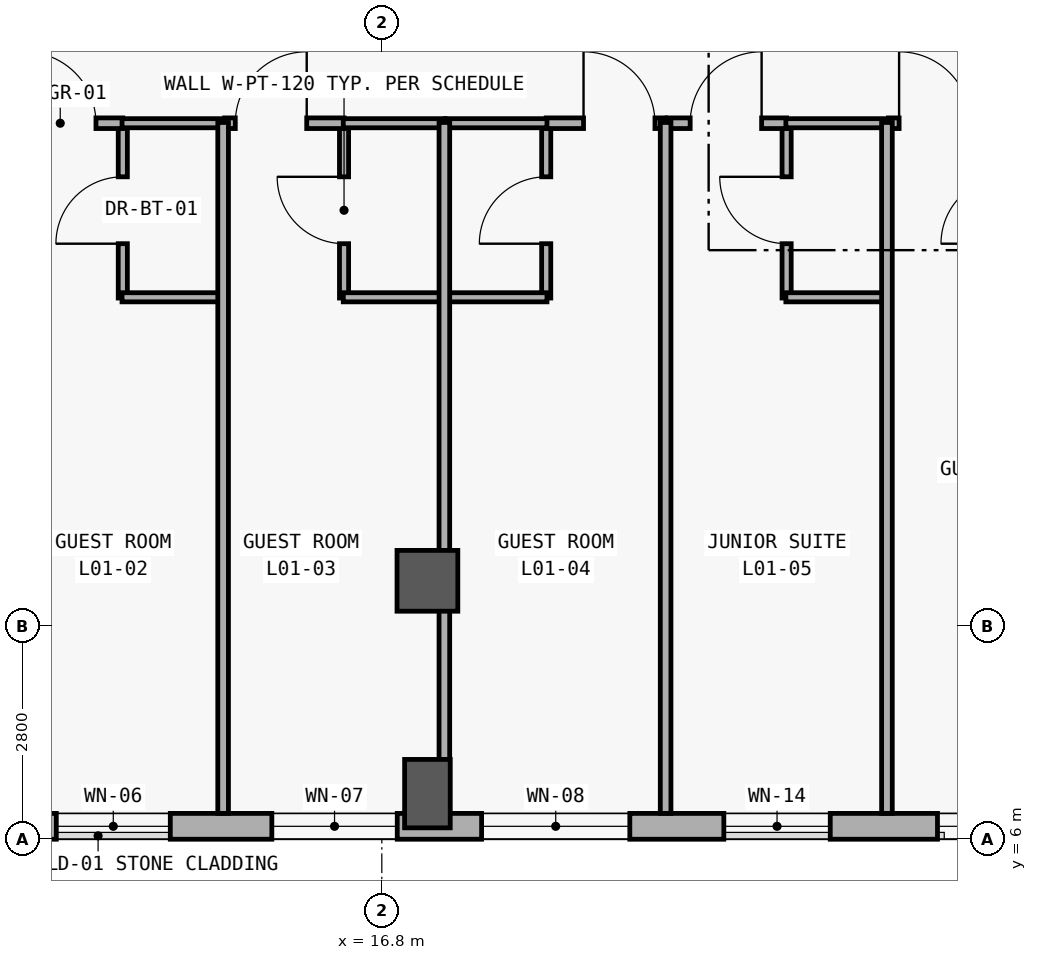
"""IFC4 building model, lengths in metres.
Left out: names, types, materials, properties, quantities, classifications, styles, units other than length and angle.
Written with IfcOpenShell. Run it as: python <this file> out.ifc"""

import sys

from ifc_helpers import new_model, si_unit, direction, frame, frame_2d, origin, origin_2d, place, context, subcontext, project, spatial, rectangle, extrude, element, fill, save


model = new_model("IFC4")
c1 = context("Model", 3, precision=1e-05, world=origin(), true_north=direction((0.0, 1.0)))
c2 = subcontext(c1, "Body", "Model", "MODEL_VIEW")
j1 = project(units=[si_unit("LENGTHUNIT", "METRE"), si_unit("PLANEANGLEUNIT", "RADIAN")], contexts=[c1])
p1 = place(None, origin())
s1 = spatial("IfcSite", under=j1, at=p1, CompositionType="ELEMENT")
p2 = place(p1, origin())
s2 = spatial("IfcBuilding", under=s1, at=p2, CompositionType="ELEMENT")
p3 = place(p2, frame((0.0, 0.0, 5.4)))
s3 = spatial("IfcBuildingStorey", under=s2, at=p3, CompositionType="ELEMENT", Elevation=5.4)
p4 = place(p3, frame((17.4, 6.6, 0.0), z_axis=(0.0, 0.0, 1.0), x_axis=(0.0, 1.0, 0.0)))
e1 = element("IfcColumn", 1, at=p4, inside=s3, PredefinedType="COLUMN", context=c2, shape_type="SweptSolid", body=[
    extrude(rectangle(XDim=0.6, YDim=0.9, at=origin_2d()), origin(), (0.0, 0.0, 1.0), 5.4),
])
p5 = place(p3, frame((17.4, 9.4, 0.0), z_axis=(0.0, 0.0, 1.0), x_axis=(1.0, 0.0, 0.0)))
e2 = element("IfcColumn", 2, at=p5, inside=s3, PredefinedType="COLUMN", context=c2, shape_type="SweptSolid", body=[
    extrude(rectangle(XDim=0.8, YDim=0.8, at=origin_2d()), origin(), (0.0, 0.0, 1.0), 5.4),
])
p6 = place(p3, frame((92.06, 6.17, 0.0), z_axis=(0.0, 0.0, 1.0), x_axis=(-1.0, 0.0, 0.0)))
e3 = element("IfcWall", 3, at=p6, inside=s3, PredefinedType="SOLIDWALL", context=c2, shape_type="SweptSolid", body=[
    extrude(rectangle(XDim=83.32, YDim=0.34, at=frame_2d((41.66, 0.0))), origin(), (0.0, 0.0, 1.0), 5.1),
])
p7 = place(p6, frame((80.804, 0.0, 0.85)))
e4 = element("IfcOpeningElement", 4, at=p7, cuts=e3, PredefinedType="OPENING", context=c2, shape_type="SweptSolid", body=[
    extrude(rectangle(XDim=1.8, YDim=1.8, at=frame_2d((0.9, 0.9))), frame((0.0, 0.18, 0.0), z_axis=(0.0, -1.0, 0.0), x_axis=(1.0, 0.0, 0.0)), (0.0, 0.0, 1.0), 0.36),
])
p8 = place(p6, frame((78.043, 0.0, 0.85)))
e5 = element("IfcOpeningElement", 5, at=p8, cuts=e3, PredefinedType="OPENING", context=c2, shape_type="SweptSolid", body=[
    extrude(rectangle(XDim=1.5, YDim=1.75, at=frame_2d((0.75, 0.875))), frame((0.0, 0.18, 0.0), z_axis=(0.0, -1.0, 0.0), x_axis=(1.0, 0.0, 0.0)), (0.0, 0.0, 1.0), 0.36),
])
p9 = place(p6, frame((75.057, 0.0, 0.85)))
e6 = element("IfcOpeningElement", 6, at=p9, cuts=e3, PredefinedType="OPENING", context=c2, shape_type="SweptSolid", body=[
    extrude(rectangle(XDim=1.65, YDim=1.75, at=frame_2d((0.825, 0.875))), frame((0.0, 0.18, 0.0), z_axis=(0.0, -1.0, 0.0), x_axis=(1.0, 0.0, 0.0)), (0.0, 0.0, 1.0), 0.36),
])
p10 = place(p6, frame((71.997, 0.0, 0.85)))
e7 = element("IfcOpeningElement", 7, at=p10, cuts=e3, PredefinedType="OPENING", context=c2, shape_type="SweptSolid", body=[
    extrude(rectangle(XDim=1.95, YDim=1.75, at=frame_2d((0.975, 0.875))), frame((0.0, 0.18, 0.0), z_axis=(0.0, -1.0, 0.0), x_axis=(1.0, 0.0, 0.0)), (0.0, 0.0, 1.0), 0.36),
])
p11 = place(p6, frame((69.36, 0.0, 0.85)))
e8 = element("IfcOpeningElement", 8, at=p11, cuts=e3, PredefinedType="OPENING", context=c2, shape_type="SweptSolid", body=[
    extrude(rectangle(XDim=1.4, YDim=1.6, at=frame_2d((0.7, 0.8))), frame((0.0, 0.18, 0.0), z_axis=(0.0, -1.0, 0.0), x_axis=(1.0, 0.0, 0.0)), (0.0, 0.0, 1.0), 0.36),
])
p12 = place(p6, frame((66.349, 0.0, 0.85)))
e9 = element("IfcOpeningElement", 9, at=p12, cuts=e3, PredefinedType="OPENING", context=c2, shape_type="SweptSolid", body=[
    extrude(rectangle(XDim=1.6, YDim=1.6, at=frame_2d((0.8, 0.8))), frame((0.0, 0.18, 0.0), z_axis=(0.0, -1.0, 0.0), x_axis=(1.0, 0.0, 0.0)), (0.0, 0.0, 1.0), 0.36),
])
p13 = place(p6, frame((63.338, 0.0, 0.85)))
e10 = element("IfcOpeningElement", 10, at=p13, cuts=e3, PredefinedType="OPENING", context=c2, shape_type="SweptSolid", body=[
    extrude(rectangle(XDim=1.8, YDim=1.6, at=frame_2d((0.9, 0.8))), frame((0.0, 0.18, 0.0), z_axis=(0.0, -1.0, 0.0), x_axis=(1.0, 0.0, 0.0)), (0.0, 0.0, 1.0), 0.36),
])
p14 = place(p6, frame((60.327, 0.0, 0.85)))
e11 = element("IfcOpeningElement", 11, at=p14, cuts=e3, PredefinedType="OPENING", context=c2, shape_type="SweptSolid", body=[
    extrude(rectangle(XDim=2.0, YDim=1.65, at=frame_2d((1.0, 0.825))), frame((0.0, 0.18, 0.0), z_axis=(0.0, -1.0, 0.0), x_axis=(1.0, 0.0, 0.0)), (0.0, 0.0, 1.0), 0.36),
])
p15 = place(p6, frame((57.791, 0.0, 0.85)))
e12 = element("IfcOpeningElement", 12, at=p15, cuts=e3, PredefinedType="OPENING", context=c2, shape_type="SweptSolid", body=[
    extrude(rectangle(XDim=1.25, YDim=1.45, at=frame_2d((0.625, 0.725))), frame((0.0, 0.18, 0.0), z_axis=(0.0, -1.0, 0.0), x_axis=(1.0, 0.0, 0.0)), (0.0, 0.0, 1.0), 0.36),
])
p16 = place(p6, frame((38.744, 0.0, 0.85)))
e13 = element("IfcOpeningElement", 13, at=p16, cuts=e3, PredefinedType="OPENING", context=c2, shape_type="SweptSolid", body=[
    extrude(rectangle(XDim=3.3, YDim=2.15, at=frame_2d((1.65, 1.075))), frame((0.0, 0.18, 0.0), z_axis=(0.0, -1.0, 0.0), x_axis=(1.0, 0.0, 0.0)), (0.0, 0.0, 1.0), 0.36),
])
p17 = place(p6, frame((35.07, 0.0, 0.85)))
e14 = element("IfcOpeningElement", 14, at=p17, cuts=e3, PredefinedType="OPENING", context=c2, shape_type="SweptSolid", body=[
    extrude(rectangle(XDim=1.18, YDim=1.5, at=frame_2d((0.59, 0.75))), frame((0.0, 0.18, 0.0), z_axis=(0.0, -1.0, 0.0), x_axis=(1.0, 0.0, 0.0)), (0.0, 0.0, 1.0), 0.36),
])
p18 = place(p6, frame((30.287, 0.0, 0.85)))
e15 = element("IfcOpeningElement", 15, at=p18, cuts=e3, PredefinedType="OPENING", context=c2, shape_type="SweptSolid", body=[
    extrude(rectangle(XDim=1.28, YDim=1.6, at=frame_2d((0.64, 0.8))), frame((0.0, 0.18, 0.0), z_axis=(0.0, -1.0, 0.0), x_axis=(1.0, 0.0, 0.0)), (0.0, 0.0, 1.0), 0.36),
])
p19 = place(p6, frame((25.503, 0.0, 0.85)))
e16 = element("IfcOpeningElement", 16, at=p19, cuts=e3, PredefinedType="OPENING", context=c2, shape_type="SweptSolid", body=[
    extrude(rectangle(XDim=1.38, YDim=1.7, at=frame_2d((0.69, 0.85))), frame((0.0, 0.18, 0.0), z_axis=(0.0, -1.0, 0.0), x_axis=(1.0, 0.0, 0.0)), (0.0, 0.0, 1.0), 0.36),
])
p20 = place(p6, frame((20.72, 0.0, 0.85)))
e17 = element("IfcOpeningElement", 17, at=p20, cuts=e3, PredefinedType="OPENING", context=c2, shape_type="SweptSolid", body=[
    extrude(rectangle(XDim=1.48, YDim=1.8, at=frame_2d((0.74, 0.9))), frame((0.0, 0.18, 0.0), z_axis=(0.0, -1.0, 0.0), x_axis=(1.0, 0.0, 0.0)), (0.0, 0.0, 1.0), 0.36),
])
p21 = place(p6, frame((15.937, 0.0, 0.85)))
e18 = element("IfcOpeningElement", 18, at=p21, cuts=e3, PredefinedType="OPENING", context=c2, shape_type="SweptSolid", body=[
    extrude(rectangle(XDim=1.58, YDim=1.85, at=frame_2d((0.79, 0.925))), frame((0.0, 0.18, 0.0), z_axis=(0.0, -1.0, 0.0), x_axis=(1.0, 0.0, 0.0)), (0.0, 0.0, 1.0), 0.36),
])
p22 = place(p6, frame((11.154, 0.0, 0.85)))
e19 = element("IfcOpeningElement", 19, at=p22, cuts=e3, PredefinedType="OPENING", context=c2, shape_type="SweptSolid", body=[
    extrude(rectangle(XDim=1.68, YDim=1.9, at=frame_2d((0.84, 0.95))), frame((0.0, 0.18, 0.0), z_axis=(0.0, -1.0, 0.0), x_axis=(1.0, 0.0, 0.0)), (0.0, 0.0, 1.0), 0.36),
])
p23 = place(p6, frame((6.37, 0.0, 0.85)))
e20 = element("IfcOpeningElement", 20, at=p23, cuts=e3, PredefinedType="OPENING", context=c2, shape_type="SweptSolid", body=[
    extrude(rectangle(XDim=1.78, YDim=1.95, at=frame_2d((0.89, 0.975))), frame((0.0, 0.18, 0.0), z_axis=(0.0, -1.0, 0.0), x_axis=(1.0, 0.0, 0.0)), (0.0, 0.0, 1.0), 0.36),
])
p24 = place(p6, frame((1.586, 0.0, 0.85)))
e21 = element("IfcOpeningElement", 21, at=p24, cuts=e3, PredefinedType="OPENING", context=c2, shape_type="SweptSolid", body=[
    extrude(rectangle(XDim=1.88, YDim=1.95, at=frame_2d((0.94, 0.975))), frame((0.0, 0.18, 0.0), z_axis=(0.0, -1.0, 0.0), x_axis=(1.0, 0.0, 0.0)), (0.0, 0.0, 1.0), 0.36),
])
p25 = place(p3, frame((13.392, 13.12, 0.0), z_axis=(0.0, 0.0, 1.0), x_axis=(0.0, 1.0, 0.0)))
e22 = element("IfcWall", 22, at=p25, inside=s3, PredefinedType="PARTITIONING", context=c2, shape_type="SweptSolid", body=[
    extrude(rectangle(XDim=2.31, YDim=0.12, at=frame_2d((1.155, 0.0))), origin(), (0.0, 0.0, 1.0), 4.18),
])
p26 = place(p25, frame((0.715, 0.0, 0.0)))
e23 = element("IfcOpeningElement", 23, at=p26, cuts=e22, PredefinedType="OPENING", context=c2, shape_type="SweptSolid", body=[
    extrude(rectangle(XDim=0.88, YDim=2.15, at=frame_2d((0.44, 1.075))), frame((0.0, 0.07, 0.0), z_axis=(0.0, -1.0, 0.0), x_axis=(1.0, 0.0, 0.0)), (0.0, 0.0, 1.0), 0.14),
])
p27 = place(p3, frame((16.303, 13.12, 0.0), z_axis=(0.0, 0.0, 1.0), x_axis=(0.0, 1.0, 0.0)))
e24 = element("IfcWall", 24, at=p27, inside=s3, PredefinedType="PARTITIONING", context=c2, shape_type="SweptSolid", body=[
    extrude(rectangle(XDim=2.31, YDim=0.12, at=frame_2d((1.155, 0.0))), origin(), (0.0, 0.0, 1.0), 4.18),
])
p28 = place(p27, frame((0.715, 0.0, 0.0)))
e25 = element("IfcOpeningElement", 25, at=p28, cuts=e24, PredefinedType="OPENING", context=c2, shape_type="SweptSolid", body=[
    extrude(rectangle(XDim=0.88, YDim=2.15, at=frame_2d((0.44, 1.075))), frame((0.0, 0.07, 0.0), z_axis=(0.0, -1.0, 0.0), x_axis=(1.0, 0.0, 0.0)), (0.0, 0.0, 1.0), 0.14),
])
p29 = place(p3, frame((18.963, 13.12, 0.0), z_axis=(0.0, 0.0, 1.0), x_axis=(0.0, 1.0, 0.0)))
e26 = element("IfcWall", 26, at=p29, inside=s3, PredefinedType="PARTITIONING", context=c2, shape_type="SweptSolid", body=[
    extrude(rectangle(XDim=2.31, YDim=0.12, at=frame_2d((1.155, 0.0))), origin(), (0.0, 0.0, 1.0), 4.18),
])
p30 = place(p29, frame((0.715, 0.0, 0.0)))
e27 = element("IfcOpeningElement", 27, at=p30, cuts=e26, PredefinedType="OPENING", context=c2, shape_type="SweptSolid", body=[
    extrude(rectangle(XDim=0.88, YDim=2.15, at=frame_2d((0.44, 1.075))), frame((0.0, 0.07, 0.0), z_axis=(0.0, -1.0, 0.0), x_axis=(1.0, 0.0, 0.0)), (0.0, 0.0, 1.0), 0.14),
])
p31 = place(p3, frame((22.126, 13.12, 0.0), z_axis=(0.0, 0.0, 1.0), x_axis=(0.0, 1.0, 0.0)))
e28 = element("IfcWall", 28, at=p31, inside=s3, PredefinedType="PARTITIONING", context=c2, shape_type="SweptSolid", body=[
    extrude(rectangle(XDim=2.31, YDim=0.12, at=frame_2d((1.155, 0.0))), origin(), (0.0, 0.0, 1.0), 4.18),
])
p32 = place(p31, frame((0.715, 0.0, 0.0)))
e29 = element("IfcOpeningElement", 29, at=p32, cuts=e28, PredefinedType="OPENING", context=c2, shape_type="SweptSolid", body=[
    extrude(rectangle(XDim=0.88, YDim=2.15, at=frame_2d((0.44, 1.075))), frame((0.0, 0.07, 0.0), z_axis=(0.0, -1.0, 0.0), x_axis=(1.0, 0.0, 0.0)), (0.0, 0.0, 1.0), 0.14),
])
p33 = place(p3, frame((11.821, 15.42, 0.0), z_axis=(0.0, 0.0, 1.0), x_axis=(1.0, 0.0, 0.0)))
e30 = element("IfcWall", 30, at=p33, inside=s3, PredefinedType="PARTITIONING", context=c2, shape_type="SweptSolid", body=[
    extrude(rectangle(XDim=1.571, YDim=0.14, at=frame_2d((0.786, 0.0))), origin(), (0.0, 0.0, 1.0), 4.18),
])
p34 = place(p33, frame((0.278, 0.0, 0.0)))
e31 = element("IfcOpeningElement", 31, at=p34, cuts=e30, PredefinedType="OPENING", context=c2, shape_type="SweptSolid", body=[
    extrude(rectangle(XDim=0.94, YDim=2.2, at=frame_2d((0.47, 1.1))), frame((0.0, 0.08, 0.0), z_axis=(0.0, -1.0, 0.0), x_axis=(1.0, 0.0, 0.0)), (0.0, 0.0, 1.0), 0.16),
])
p35 = place(p3, frame((14.732, 15.42, 0.0), z_axis=(0.0, 0.0, 1.0), x_axis=(1.0, 0.0, 0.0)))
e32 = element("IfcWall", 32, at=p35, inside=s3, PredefinedType="PARTITIONING", context=c2, shape_type="SweptSolid", body=[
    extrude(rectangle(XDim=1.571, YDim=0.14, at=frame_2d((0.786, 0.0))), origin(), (0.0, 0.0, 1.0), 4.18),
])
p36 = place(p35, frame((0.14, 0.0, 0.0)))
e33 = element("IfcOpeningElement", 33, at=p36, cuts=e32, PredefinedType="OPENING", context=c2, shape_type="SweptSolid", body=[
    extrude(rectangle(XDim=0.94, YDim=2.2, at=frame_2d((0.47, 1.1))), frame((0.0, 0.08, 0.0), z_axis=(0.0, -1.0, 0.0), x_axis=(1.0, 0.0, 0.0)), (0.0, 0.0, 1.0), 0.16),
])
p37 = place(p3, frame((18.963, 15.42, 0.0), z_axis=(0.0, 0.0, 1.0), x_axis=(1.0, 0.0, 0.0)))
e34 = element("IfcWall", 34, at=p37, inside=s3, PredefinedType="PARTITIONING", context=c2, shape_type="SweptSolid", body=[
    extrude(rectangle(XDim=1.571, YDim=0.14, at=frame_2d((0.786, 0.0))), origin(), (0.0, 0.0, 1.0), 4.18),
])
p38 = place(p37, frame((0.491, 0.0, 0.0)))
e35 = element("IfcOpeningElement", 35, at=p38, cuts=e34, PredefinedType="OPENING", context=c2, shape_type="SweptSolid", body=[
    extrude(rectangle(XDim=0.94, YDim=2.2, at=frame_2d((0.47, 1.1))), frame((0.0, 0.08, 0.0), z_axis=(0.0, -1.0, 0.0), x_axis=(1.0, 0.0, 0.0)), (0.0, 0.0, 1.0), 0.16),
])
p39 = place(p3, frame((20.554, 15.42, 0.0), z_axis=(0.0, 0.0, 1.0), x_axis=(1.0, 0.0, 0.0)))
e36 = element("IfcWall", 36, at=p39, inside=s3, PredefinedType="PARTITIONING", context=c2, shape_type="SweptSolid", body=[
    extrude(rectangle(XDim=1.572, YDim=0.14, at=frame_2d((0.786, 0.0))), origin(), (0.0, 0.0, 1.0), 4.18),
])
p40 = place(p39, frame((0.303, 0.0, 0.0)))
e37 = element("IfcOpeningElement", 37, at=p40, cuts=e36, PredefinedType="OPENING", context=c2, shape_type="SweptSolid", body=[
    extrude(rectangle(XDim=0.94, YDim=2.2, at=frame_2d((0.47, 1.1))), frame((0.0, 0.08, 0.0), z_axis=(0.0, -1.0, 0.0), x_axis=(1.0, 0.0, 0.0)), (0.0, 0.0, 1.0), 0.16),
])
p41 = place(p3, frame((23.466, 15.42, 0.0), z_axis=(0.0, 0.0, 1.0), x_axis=(1.0, 0.0, 0.0)))
e38 = element("IfcWall", 38, at=p41, inside=s3, PredefinedType="PARTITIONING", context=c2, shape_type="SweptSolid", body=[
    extrude(rectangle(XDim=1.571, YDim=0.14, at=frame_2d((0.786, 0.0))), origin(), (0.0, 0.0, 1.0), 4.18),
])
p42 = place(p41, frame((0.14, 0.0, 0.0)))
e39 = element("IfcOpeningElement", 39, at=p42, cuts=e38, PredefinedType="OPENING", context=c2, shape_type="SweptSolid", body=[
    extrude(rectangle(XDim=0.94, YDim=2.2, at=frame_2d((0.47, 1.1))), frame((0.0, 0.08, 0.0), z_axis=(0.0, -1.0, 0.0), x_axis=(1.0, 0.0, 0.0)), (0.0, 0.0, 1.0), 0.16),
])
for number, where, z_axis, x_axis in (
    (40, (13.382, 13.13, 0.0), (0.0, 0.0, 1.0), (1.0, 0.0, 0.0)),
    (41, (13.382, 15.42, 0.0), (0.0, 0.0, 1.0), (1.0, 0.0, 0.0)),
):
    element("IfcWall", number, at=place(p3, frame(where, z_axis=z_axis, x_axis=x_axis)), inside=s3, PredefinedType="PARTITIONING", context=c2, shape_type="SweptSolid", body=[
        extrude(rectangle(XDim=1.34, YDim=0.12, at=frame_2d((0.67, 0.0))), origin(), (0.0, 0.0, 1.0), 4.18),
    ])
for number, where, z_axis, x_axis in (
    (42, (16.293, 13.13, 0.0), (0.0, 0.0, 1.0), (1.0, 0.0, 0.0)),
    (43, (16.293, 15.42, 0.0), (0.0, 0.0, 1.0), (1.0, 0.0, 0.0)),
):
    element("IfcWall", number, at=place(p3, frame(where, z_axis=z_axis, x_axis=x_axis)), inside=s3, PredefinedType="PARTITIONING", context=c2, shape_type="SweptSolid", body=[
        extrude(rectangle(XDim=1.34, YDim=0.12, at=frame_2d((0.67, 0.0))), origin(), (0.0, 0.0, 1.0), 4.18),
    ])
for number, where, z_axis, x_axis in (
    (44, (17.633, 13.13, 0.0), (0.0, 0.0, 1.0), (1.0, 0.0, 0.0)),
    (45, (17.633, 15.42, 0.0), (0.0, 0.0, 1.0), (1.0, 0.0, 0.0)),
):
    element("IfcWall", number, at=place(p3, frame(where, z_axis=z_axis, x_axis=x_axis)), inside=s3, PredefinedType="PARTITIONING", context=c2, shape_type="SweptSolid", body=[
        extrude(rectangle(XDim=1.34, YDim=0.12, at=frame_2d((0.67, 0.0))), origin(), (0.0, 0.0, 1.0), 4.18),
    ])
for number, where, z_axis, x_axis in (
    (46, (22.116, 13.13, 0.0), (0.0, 0.0, 1.0), (1.0, 0.0, 0.0)),
    (47, (22.116, 15.42, 0.0), (0.0, 0.0, 1.0), (1.0, 0.0, 0.0)),
):
    element("IfcWall", number, at=place(p3, frame(where, z_axis=z_axis, x_axis=x_axis)), inside=s3, PredefinedType="PARTITIONING", context=c2, shape_type="SweptSolid", body=[
        extrude(rectangle(XDim=1.34, YDim=0.12, at=frame_2d((0.67, 0.0))), origin(), (0.0, 0.0, 1.0), 4.18),
    ])
for number, where, z_axis, x_axis in (
    (48, (14.712, 6.34, 0.0), (0.0, 0.0, 1.0), (0.0, 1.0, 0.0)),
    (49, (17.623, 6.34, 0.0), (0.0, 0.0, 1.0), (0.0, 1.0, 0.0)),
    (50, (20.534, 6.34, 0.0), (0.0, 0.0, 1.0), (0.0, 1.0, 0.0)),
    (51, (23.446, 6.34, 0.0), (0.0, 0.0, 1.0), (0.0, 1.0, 0.0)),
):
    element("IfcWall", number, at=place(p3, frame(where, z_axis=z_axis, x_axis=x_axis)), inside=s3, PredefinedType="PARTITIONING", context=c2, shape_type="SweptSolid", body=[
        extrude(rectangle(XDim=9.09, YDim=0.14, at=frame_2d((4.545, 0.0))), origin(), (0.0, 0.0, 1.0), 4.18),
    ])
p43 = place(p8, origin())
e52 = element("IfcWindow", 52, at=p43, inside=s3, PartitioningType="SINGLE_PANEL", PredefinedType="WINDOW", context=c2, shape_type="SweptSolid", body=[
    extrude(rectangle(XDim=1.5, YDim=1.75, at=frame_2d((0.75, 0.875))), frame((0.0, 0.03, 0.0), z_axis=(0.0, -1.0, 0.0), x_axis=(1.0, 0.0, 0.0)), (0.0, 0.0, 1.0), 0.06),
])
fill(e5, e52)
p44 = place(p9, origin())
e53 = element("IfcWindow", 53, at=p44, inside=s3, PartitioningType="SINGLE_PANEL", PredefinedType="WINDOW", context=c2, shape_type="SweptSolid", body=[
    extrude(rectangle(XDim=1.65, YDim=1.75, at=frame_2d((0.825, 0.875))), frame((0.0, 0.03, 0.0), z_axis=(0.0, -1.0, 0.0), x_axis=(1.0, 0.0, 0.0)), (0.0, 0.0, 1.0), 0.06),
])
fill(e6, e53)
p45 = place(p10, origin())
e54 = element("IfcWindow", 54, at=p45, inside=s3, PartitioningType="SINGLE_PANEL", PredefinedType="WINDOW", context=c2, shape_type="SweptSolid", body=[
    extrude(rectangle(XDim=1.95, YDim=1.75, at=frame_2d((0.975, 0.875))), frame((0.0, 0.03, 0.0), z_axis=(0.0, -1.0, 0.0), x_axis=(1.0, 0.0, 0.0)), (0.0, 0.0, 1.0), 0.06),
])
fill(e7, e54)
p46 = place(p11, origin())
e55 = element("IfcWindow", 55, at=p46, inside=s3, PartitioningType="SINGLE_PANEL", PredefinedType="WINDOW", context=c2, shape_type="SweptSolid", body=[
    extrude(rectangle(XDim=1.4, YDim=1.6, at=frame_2d((0.7, 0.8))), frame((0.0, 0.03, 0.0), z_axis=(0.0, -1.0, 0.0), x_axis=(1.0, 0.0, 0.0)), (0.0, 0.0, 1.0), 0.06),
])
fill(e8, e55)
p47 = place(p12, origin())
e56 = element("IfcWindow", 56, at=p47, inside=s3, PartitioningType="SINGLE_PANEL", PredefinedType="WINDOW", context=c2, shape_type="SweptSolid", body=[
    extrude(rectangle(XDim=1.6, YDim=1.6, at=frame_2d((0.8, 0.8))), frame((0.0, 0.03, 0.0), z_axis=(0.0, -1.0, 0.0), x_axis=(1.0, 0.0, 0.0)), (0.0, 0.0, 1.0), 0.06),
])
fill(e9, e56)
p48 = place(p26, origin())
e57 = element("IfcDoor", 57, at=p48, inside=s3, OperationType="SINGLE_SWING_LEFT", PredefinedType="DOOR", context=c2, shape_type="SweptSolid", body=[
    extrude(rectangle(XDim=0.88, YDim=2.15, at=frame_2d((0.44, 1.075))), frame((0.0, 0.025, 0.0), z_axis=(0.0, -1.0, 0.0), x_axis=(1.0, 0.0, 0.0)), (0.0, 0.0, 1.0), 0.05),
])
fill(e23, e57)
p49 = place(p28, origin())
e58 = element("IfcDoor", 58, at=p49, inside=s3, OperationType="SINGLE_SWING_RIGHT", PredefinedType="DOOR", context=c2, shape_type="SweptSolid", body=[
    extrude(rectangle(XDim=0.88, YDim=2.15, at=frame_2d((0.44, 1.075))), frame((0.0, 0.025, 0.0), z_axis=(0.0, -1.0, 0.0), x_axis=(1.0, 0.0, 0.0)), (0.0, 0.0, 1.0), 0.05),
])
fill(e25, e58)
p50 = place(p30, origin())
e59 = element("IfcDoor", 59, at=p50, inside=s3, OperationType="SINGLE_SWING_LEFT", PredefinedType="DOOR", context=c2, shape_type="SweptSolid", body=[
    extrude(rectangle(XDim=0.88, YDim=2.15, at=frame_2d((0.44, 1.075))), frame((0.0, 0.025, 0.0), z_axis=(0.0, -1.0, 0.0), x_axis=(1.0, 0.0, 0.0)), (0.0, 0.0, 1.0), 0.05),
])
fill(e27, e59)
p51 = place(p32, origin())
e60 = element("IfcDoor", 60, at=p51, inside=s3, OperationType="SINGLE_SWING_RIGHT", PredefinedType="DOOR", context=c2, shape_type="SweptSolid", body=[
    extrude(rectangle(XDim=0.88, YDim=2.15, at=frame_2d((0.44, 1.075))), frame((0.0, 0.025, 0.0), z_axis=(0.0, -1.0, 0.0), x_axis=(1.0, 0.0, 0.0)), (0.0, 0.0, 1.0), 0.05),
])
fill(e29, e60)
p52 = place(p34, origin())
e61 = element("IfcDoor", 61, at=p52, inside=s3, OperationType="SINGLE_SWING_LEFT", PredefinedType="DOOR", context=c2, shape_type="SweptSolid", body=[
    extrude(rectangle(XDim=0.94, YDim=2.2, at=frame_2d((0.47, 1.1))), frame((0.0, 0.025, 0.0), z_axis=(0.0, -1.0, 0.0), x_axis=(1.0, 0.0, 0.0)), (0.0, 0.0, 1.0), 0.05),
])
fill(e31, e61)
p53 = place(p36, origin())
e62 = element("IfcDoor", 62, at=p53, inside=s3, OperationType="SINGLE_SWING_RIGHT", PredefinedType="DOOR", context=c2, shape_type="SweptSolid", body=[
    extrude(rectangle(XDim=0.94, YDim=2.2, at=frame_2d((0.47, 1.1))), frame((0.0, 0.025, 0.0), z_axis=(0.0, -1.0, 0.0), x_axis=(1.0, 0.0, 0.0)), (0.0, 0.0, 1.0), 0.05),
])
fill(e33, e62)
p54 = place(p38, origin())
e63 = element("IfcDoor", 63, at=p54, inside=s3, OperationType="SINGLE_SWING_LEFT", PredefinedType="DOOR", context=c2, shape_type="SweptSolid", body=[
    extrude(rectangle(XDim=0.94, YDim=2.2, at=frame_2d((0.47, 1.1))), frame((0.0, 0.025, 0.0), z_axis=(0.0, -1.0, 0.0), x_axis=(1.0, 0.0, 0.0)), (0.0, 0.0, 1.0), 0.05),
])
fill(e35, e63)
p55 = place(p40, origin())
e64 = element("IfcDoor", 64, at=p55, inside=s3, OperationType="SINGLE_SWING_RIGHT", PredefinedType="DOOR", context=c2, shape_type="SweptSolid", body=[
    extrude(rectangle(XDim=0.94, YDim=2.2, at=frame_2d((0.47, 1.1))), frame((0.0, 0.025, 0.0), z_axis=(0.0, -1.0, 0.0), x_axis=(1.0, 0.0, 0.0)), (0.0, 0.0, 1.0), 0.05),
])
fill(e37, e64)
p56 = place(p42, origin())
e65 = element("IfcDoor", 65, at=p56, inside=s3, OperationType="SINGLE_SWING_LEFT", PredefinedType="DOOR", context=c2, shape_type="SweptSolid", body=[
    extrude(rectangle(XDim=0.94, YDim=2.2, at=frame_2d((0.47, 1.1))), frame((0.0, 0.025, 0.0), z_axis=(0.0, -1.0, 0.0), x_axis=(1.0, 0.0, 0.0)), (0.0, 0.0, 1.0), 0.05),
])
fill(e39, e65)
save(model, sys.argv[1])
